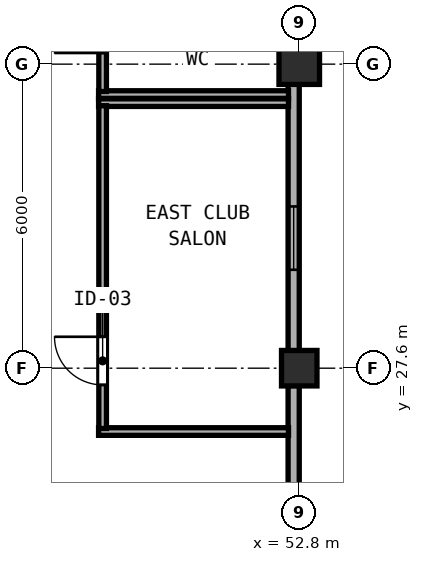
"""IFC4 building model, lengths in metres.
Left out: names, types, materials, properties, quantities, classifications, styles, units other than length and angle.
Written with IfcOpenShell. Run it as: python <this file> out.ifc"""

import sys

from ifc_helpers import new_model, si_unit, direction, frame, frame_2d, origin, origin_2d, place, context, subcontext, project, spatial, rectangle, hollow_rectangle, extrude, element, fill, save


model = new_model("IFC4")
c1 = context("Model", 3, precision=1e-05, world=origin(), true_north=direction((0.0, 1.0)))
c2 = subcontext(c1, "Body", "Model", "MODEL_VIEW")
j1 = project(units=[si_unit("LENGTHUNIT", "METRE"), si_unit("PLANEANGLEUNIT", "RADIAN")], contexts=[c1])
p1 = place(None, origin())
s1 = spatial("IfcSite", under=j1, at=p1, CompositionType="ELEMENT")
p2 = place(p1, origin())
s2 = spatial("IfcBuilding", under=s1, at=p2, CompositionType="ELEMENT")
p3 = place(p2, frame((0.0, 0.0, 258.3)))
s3 = spatial("IfcBuildingStorey", under=s2, at=p3, CompositionType="ELEMENT", Elevation=258.3)
p4 = place(p3, frame((52.8, 33.6, 0.0), z_axis=(0.0, 0.0, 1.0), x_axis=(1.0, 0.0, 0.0)))
e1 = element("IfcColumn", 1, at=p4, inside=s3, PredefinedType="COLUMN", context=c2, shape_type="SweptSolid", body=[
    extrude(hollow_rectangle(XDim=0.8, YDim=0.8, WallThickness=0.03, at=origin_2d()), origin(), (0.0, 0.0, 1.0), 3.85),
])
p5 = place(p3, frame((52.8, 27.6, 0.0), z_axis=(0.0, 0.0, 1.0), x_axis=(1.0, 0.0, 0.0)))
e2 = element("IfcColumn", 2, at=p5, inside=s3, PredefinedType="COLUMN", context=c2, shape_type="SweptSolid", body=[
    extrude(hollow_rectangle(XDim=0.7, YDim=0.7, WallThickness=0.026, at=origin_2d()), origin(), (0.0, 0.0, 1.0), 3.85),
])
p6 = place(p3, frame((52.69, 21.992, 0.0), z_axis=(0.0, 0.0, 1.0), x_axis=(0.0, 1.0, 0.0)))
e3 = element("IfcWall", 3, at=p6, inside=s3, PredefinedType="SOLIDWALL", context=c2, shape_type="SweptSolid", body=[
    extrude(rectangle(XDim=5.266, YDim=0.22, at=frame_2d((2.633, 0.0))), origin(), (0.0, 0.0, 1.0), 3.315),
])
p7 = place(p6, frame((1.6, 0.0, 0.85)))
e4 = element("IfcOpeningElement", 4, at=p7, cuts=e3, PredefinedType="OPENING", context=c2, shape_type="SweptSolid", body=[
    extrude(rectangle(XDim=1.25, YDim=1.95, at=frame_2d((0.625, 0.975))), frame((0.0, 0.12, 0.0), z_axis=(0.0, -1.0, 0.0), x_axis=(1.0, 0.0, 0.0)), (0.0, 0.0, 1.0), 0.24),
])
p8 = place(p3, frame((52.69, 27.942, 0.0), z_axis=(0.0, 0.0, 1.0), x_axis=(0.0, 1.0, 0.0)))
e5 = element("IfcWall", 5, at=p8, inside=s3, PredefinedType="SOLIDWALL", context=c2, shape_type="SweptSolid", body=[
    extrude(rectangle(XDim=5.266, YDim=0.22, at=frame_2d((2.633, 0.0))), origin(), (0.0, 0.0, 1.0), 3.315),
])
p9 = place(p8, frame((1.6, 0.0, 0.85)))
e6 = element("IfcOpeningElement", 6, at=p9, cuts=e5, PredefinedType="OPENING", context=c2, shape_type="SweptSolid", body=[
    extrude(rectangle(XDim=1.25, YDim=1.95, at=frame_2d((0.625, 0.975))), frame((0.0, 0.12, 0.0), z_axis=(0.0, -1.0, 0.0), x_axis=(1.0, 0.0, 0.0)), (0.0, 0.0, 1.0), 0.24),
])
p10 = place(p3, frame((48.84, 33.0, 0.0), z_axis=(0.0, 0.0, 1.0), x_axis=(1.0, 0.0, 0.0)))
e7 = element("IfcWall", 7, at=p10, inside=s3, PredefinedType="PARTITIONING", context=c2, shape_type="SweptSolid", body=[
    extrude(rectangle(XDim=3.748, YDim=0.15, at=frame_2d((1.874, 0.0))), origin(), (0.0, 0.0, 1.0), 3.67),
])
p11 = place(p3, frame((48.92, 33.06, 0.0), z_axis=(0.0, 0.0, 1.0), x_axis=(0.0, 1.0, 0.0)))
e8 = element("IfcWall", 8, at=p11, inside=s3, PredefinedType="PARTITIONING", context=c2, shape_type="SweptSolid", body=[
    extrude(rectangle(XDim=3.18, YDim=0.15, at=frame_2d((1.59, 0.0))), origin(), (0.0, 0.0, 1.0), 3.67),
])
p12 = place(p11, frame((0.76, 0.0, 0.0)))
e9 = element("IfcOpeningElement", 9, at=p12, cuts=e8, PredefinedType="OPENING", context=c2, shape_type="SweptSolid", body=[
    extrude(rectangle(XDim=0.95, YDim=2.12, at=frame_2d((0.475, 1.06))), frame((0.0, 0.085, 0.0), z_axis=(0.0, -1.0, 0.0), x_axis=(1.0, 0.0, 0.0)), (0.0, 0.0, 1.0), 0.17),
])
for number, where, z_axis, x_axis in (
    (10, (48.84, 32.84, 0.0), (0.0, 0.0, 1.0), (1.0, 0.0, 0.0)),
    (11, (48.84, 26.35, 0.0), (0.0, 0.0, 1.0), (1.0, 0.0, 0.0)),
):
    element("IfcWall", number, at=place(p3, frame(where, z_axis=z_axis, x_axis=x_axis)), inside=s3, PredefinedType="PARTITIONING", context=c2, shape_type="SweptSolid", body=[
        extrude(rectangle(XDim=3.748, YDim=0.15, at=frame_2d((1.874, 0.0))), origin(), (0.0, 0.0, 1.0), 3.67),
    ])
p13 = place(p3, frame((48.92, 26.41, 0.0), z_axis=(0.0, 0.0, 1.0), x_axis=(0.0, 1.0, 0.0)))
e12 = element("IfcWall", 12, at=p13, inside=s3, PredefinedType="PARTITIONING", context=c2, shape_type="SweptSolid", body=[
    extrude(rectangle(XDim=6.37, YDim=0.15, at=frame_2d((3.185, 0.0))), origin(), (0.0, 0.0, 1.0), 3.67),
])
p14 = place(p13, frame((0.86, 0.0, 0.0)))
e13 = element("IfcOpeningElement", 13, at=p14, cuts=e12, PredefinedType="OPENING", context=c2, shape_type="SweptSolid", body=[
    extrude(rectangle(XDim=0.95, YDim=2.12, at=frame_2d((0.475, 1.06))), frame((0.0, 0.085, 0.0), z_axis=(0.0, -1.0, 0.0), x_axis=(1.0, 0.0, 0.0)), (0.0, 0.0, 1.0), 0.17),
])
p15 = place(p9, origin())
e14 = element("IfcWindow", 14, at=p15, inside=s3, PartitioningType="SINGLE_PANEL", PredefinedType="WINDOW", context=c2, shape_type="SweptSolid", body=[
    extrude(rectangle(XDim=1.25, YDim=1.95, at=frame_2d((0.625, 0.975))), frame((0.0, 0.03, 0.0), z_axis=(0.0, -1.0, 0.0), x_axis=(1.0, 0.0, 0.0)), (0.0, 0.0, 1.0), 0.06),
])
fill(e6, e14)
p16 = place(p12, origin())
e15 = element("IfcDoor", 15, at=p16, inside=s3, OperationType="SINGLE_SWING_LEFT", PredefinedType="DOOR", context=c2, shape_type="SweptSolid", body=[
    extrude(rectangle(XDim=0.95, YDim=2.12, at=frame_2d((0.475, 1.06))), frame((0.0, 0.025, 0.0), z_axis=(0.0, -1.0, 0.0), x_axis=(1.0, 0.0, 0.0)), (0.0, 0.0, 1.0), 0.05),
])
fill(e9, e15)
p17 = place(p14, origin())
e16 = element("IfcDoor", 16, at=p17, inside=s3, OperationType="SINGLE_SWING_RIGHT", PredefinedType="DOOR", context=c2, shape_type="SweptSolid", body=[
    extrude(rectangle(XDim=0.95, YDim=2.12, at=frame_2d((0.475, 1.06))), frame((0.0, 0.025, 0.0), z_axis=(0.0, -1.0, 0.0), x_axis=(1.0, 0.0, 0.0)), (0.0, 0.0, 1.0), 0.05),
])
fill(e13, e16)
save(model, sys.argv[1])
